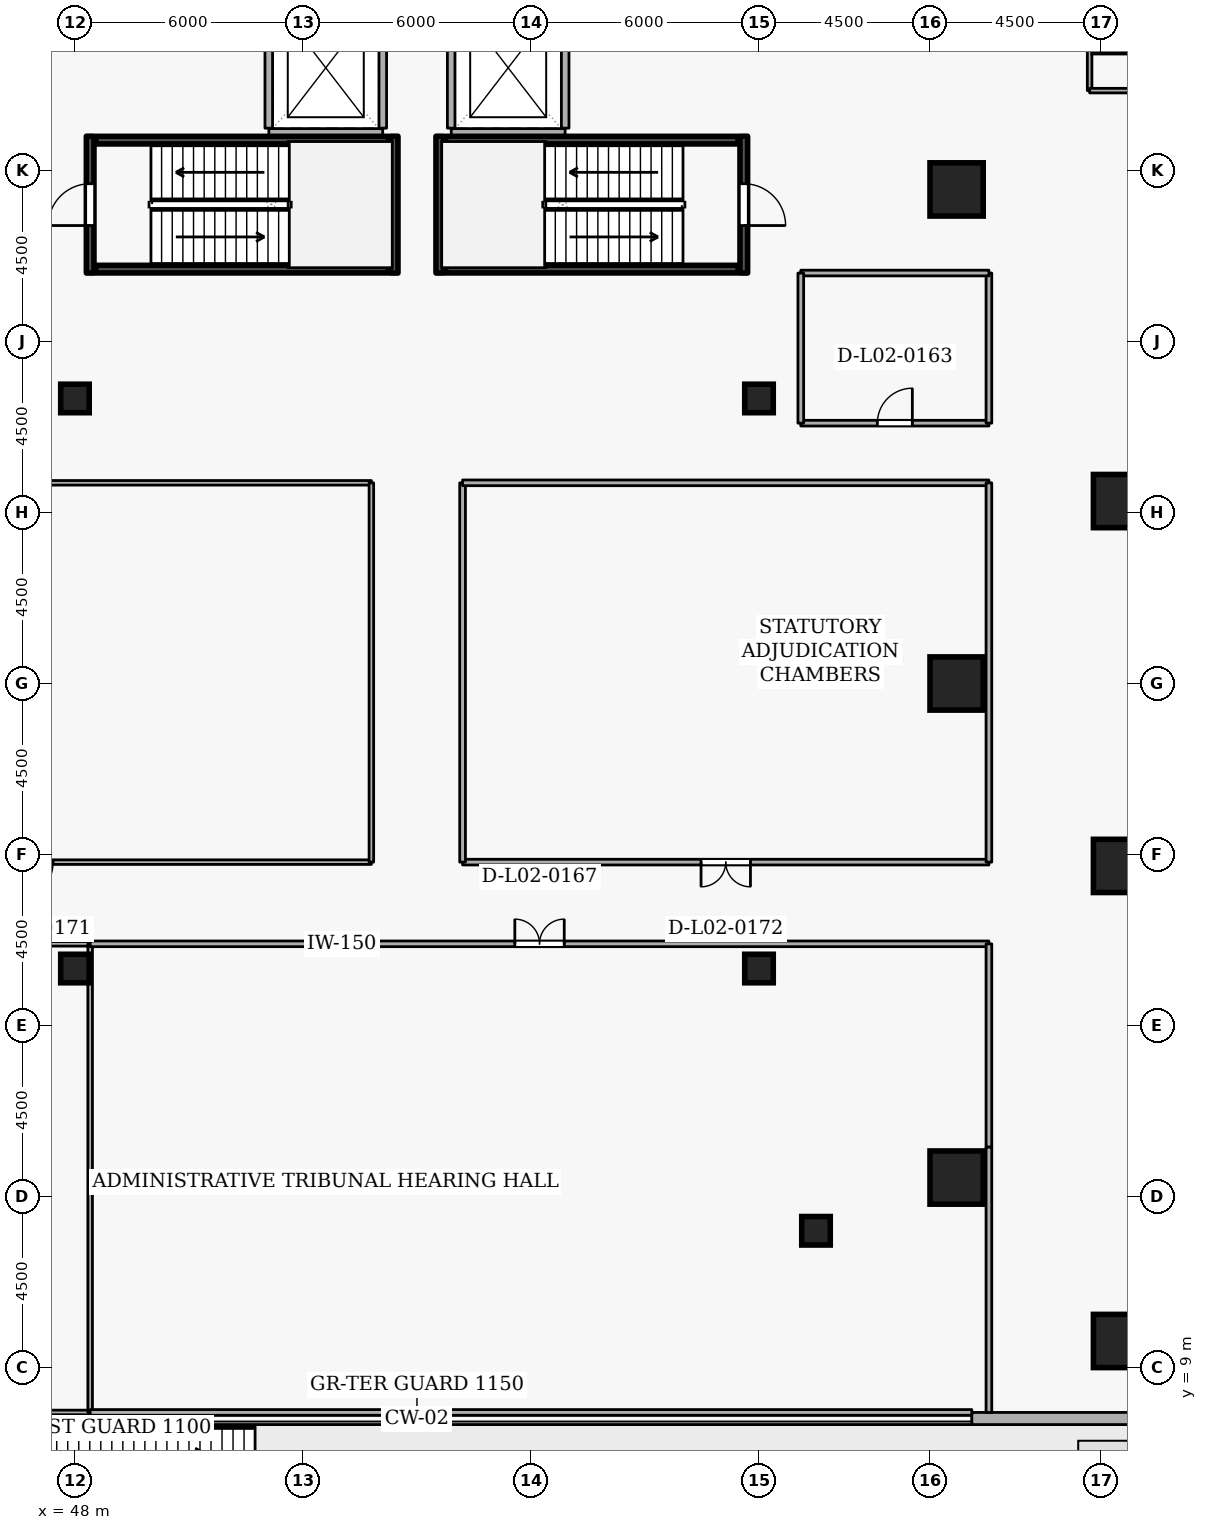
"""IFC4 building model, lengths in metres.
Left out: names, types, materials, properties, quantities, classifications, styles, units other than length and angle.
Written with IfcOpenShell. Run it as: python <this file> out.ifc"""

import sys

from ifc_helpers import new_model, si_unit, direction, frame, frame_2d, origin, origin_2d, place, context, subcontext, project, spatial, rectangle, extrude, element, fill, save


model = new_model("IFC4")
c1 = context("Model", 3, precision=1e-05, world=origin(), true_north=direction((0.0, 1.0)))
c2 = subcontext(c1, "Body", "Model", "MODEL_VIEW")
j1 = project(units=[si_unit("LENGTHUNIT", "METRE"), si_unit("PLANEANGLEUNIT", "RADIAN")], contexts=[c1])
p1 = place(None, origin())
s1 = spatial("IfcSite", under=j1, at=p1, CompositionType="ELEMENT")
p2 = place(p1, origin())
s2 = spatial("IfcBuilding", under=s1, at=p2, CompositionType="ELEMENT")
p3 = place(p2, frame((0.0, 0.0, 9.6)))
s3 = spatial("IfcBuildingStorey", under=s2, at=p3, CompositionType="ELEMENT", Elevation=9.6)
for number, where, z_axis, x_axis in (
    (1, (71.2, 14.0, 0.0), (0.0, 0.0, 1.0), (1.0, 0.0, 0.0)),
    (2, (71.2, 27.0, 0.0), (0.0, 0.0, 1.0), (1.0, 0.0, 0.0)),
    (3, (71.2, 40.0, 0.0), (0.0, 0.0, 1.0), (1.0, 0.0, 0.0)),
    (4, (75.5, 9.7, 0.0), (0.0, 0.0, 1.0), (1.0, 0.0, 0.0)),
    (5, (75.5, 22.2, 0.0), (0.0, 0.0, 1.0), (1.0, 0.0, 0.0)),
    (6, (75.5, 31.8, 0.0), (0.0, 0.0, 1.0), (1.0, 0.0, 0.0)),
):
    element("IfcColumn", number, at=place(p3, frame(where, z_axis=z_axis, x_axis=x_axis)), inside=s3, PredefinedType="COLUMN", context=c2, shape_type="SweptSolid", body=[
        extrude(rectangle(XDim=1.4, YDim=1.4, at=origin_2d()), origin(), (0.0, 0.0, 1.0), 4.5),
    ])
for number, where, z_axis, x_axis in (
    (7, (67.5, 12.6, 0.0), (0.0, 0.0, 1.0), (1.0, 0.0, 0.0)),
    (8, (48.0, 19.5, 0.0), (0.0, 0.0, 1.0), (1.0, 0.0, 0.0)),
    (9, (66.0, 19.5, 0.0), (0.0, 0.0, 1.0), (1.0, 0.0, 0.0)),
    (10, (48.0, 34.5, 0.0), (0.0, 0.0, 1.0), (1.0, 0.0, 0.0)),
    (11, (66.0, 34.5, 0.0), (0.0, 0.0, 1.0), (1.0, 0.0, 0.0)),
):
    element("IfcColumn", number, at=place(p3, frame(where, z_axis=z_axis, x_axis=x_axis)), inside=s3, PredefinedType="COLUMN", context=c2, shape_type="SweptSolid", body=[
        extrude(rectangle(XDim=0.75, YDim=0.75, at=origin_2d()), origin(), (0.0, 0.0, 1.0), 4.5),
    ])
p4 = place(p3, frame((71.6, 7.66, 0.0), z_axis=(0.0, 0.0, 1.0), x_axis=(1.0, 0.0, 0.0)))
e12 = element("IfcWall", 12, at=p4, inside=s3, PredefinedType="STANDARD", context=c2, shape_type="SweptSolid", body=[
    extrude(rectangle(XDim=39.4, YDim=0.32, at=frame_2d((19.7, 0.0))), origin(), (0.0, 0.0, 1.0), 3.56),
])
p5 = place(p4, frame((13.5, 0.0, 0.0)))
e13 = element("IfcOpeningElement", 13, at=p5, cuts=e12, PredefinedType="OPENING", context=c2, shape_type="SweptSolid", body=[
    extrude(rectangle(XDim=1.15, YDim=2.1, at=frame_2d((0.575, 1.05))), frame((0.0, 0.17, 0.0), z_axis=(0.0, -1.0, 0.0), x_axis=(1.0, 0.0, 0.0)), (0.0, 0.0, 1.0), 0.34),
])
p6 = place(p4, frame((22.8, 0.0, 0.78)))
e14 = element("IfcOpeningElement", 14, at=p6, cuts=e12, PredefinedType="OPENING", context=c2, shape_type="SweptSolid", body=[
    extrude(rectangle(XDim=1.8, YDim=2.15, at=frame_2d((0.9, 1.075))), frame((0.0, 0.17, 0.0), z_axis=(0.0, -1.0, 0.0), x_axis=(1.0, 0.0, 0.0)), (0.0, 0.0, 1.0), 0.34),
])
p7 = place(p4, frame((32.8, 0.0, 0.78)))
e15 = element("IfcOpeningElement", 15, at=p7, cuts=e12, PredefinedType="OPENING", context=c2, shape_type="SweptSolid", body=[
    extrude(rectangle(XDim=1.8, YDim=2.15, at=frame_2d((0.9, 1.075))), frame((0.0, 0.17, 0.0), z_axis=(0.0, -1.0, 0.0), x_axis=(1.0, 0.0, 0.0)), (0.0, 0.0, 1.0), 0.34),
])
p8 = place(p3, frame((53.102, 41.5, 0.0), z_axis=(0.0, 0.0, 1.0), x_axis=(1.0, 0.0, 0.0)))
e16 = element("IfcWall", 16, at=p8, inside=s3, PredefinedType="STANDARD", context=c2, shape_type="SweptSolid", body=[
    extrude(rectangle(XDim=2.996, YDim=0.2, at=frame_2d((1.498, 0.0))), origin(), (0.0, 0.0, 1.0), 4.16),
])
for number, where, z_axis, x_axis in (
    (17, (56.1, 41.612, 0.0), (0.0, 0.0, 1.0), (0.0, 1.0, 0.0)),
    (18, (53.1, 41.612, 0.0), (0.0, 0.0, 1.0), (0.0, 1.0, 0.0)),
):
    element("IfcWall", number, at=place(p3, frame(where, z_axis=z_axis, x_axis=x_axis)), inside=s3, PredefinedType="STANDARD", context=c2, shape_type="SweptSolid", body=[
        extrude(rectangle(XDim=3.286, YDim=0.2, at=frame_2d((1.643, 0.0))), origin(), (0.0, 0.0, 1.0), 4.16),
    ])
p9 = place(p3, frame((57.902, 41.5, 0.0), z_axis=(0.0, 0.0, 1.0), x_axis=(1.0, 0.0, 0.0)))
e19 = element("IfcWall", 19, at=p9, inside=s3, PredefinedType="STANDARD", context=c2, shape_type="SweptSolid", body=[
    extrude(rectangle(XDim=2.996, YDim=0.2, at=frame_2d((1.498, 0.0))), origin(), (0.0, 0.0, 1.0), 4.16),
])
for number, where, z_axis, x_axis in (
    (20, (60.9, 41.612, 0.0), (0.0, 0.0, 1.0), (0.0, 1.0, 0.0)),
    (21, (57.9, 41.612, 0.0), (0.0, 0.0, 1.0), (0.0, 1.0, 0.0)),
):
    element("IfcWall", number, at=place(p3, frame(where, z_axis=z_axis, x_axis=x_axis)), inside=s3, PredefinedType="STANDARD", context=c2, shape_type="SweptSolid", body=[
        extrude(rectangle(XDim=3.286, YDim=0.2, at=frame_2d((1.643, 0.0))), origin(), (0.0, 0.0, 1.0), 4.16),
    ])
p10 = place(p3, frame((48.4, 37.8, 0.0), z_axis=(0.0, 0.0, 1.0), x_axis=(0.0, 1.0, 0.0)))
e22 = element("IfcWall", 22, at=p10, inside=s3, PredefinedType="SHEAR", context=c2, shape_type="SweptSolid", body=[
    extrude(rectangle(XDim=3.6, YDim=0.2, at=frame_2d((1.8, 0.0))), origin(), (0.0, 0.0, 1.0), 4.5),
])
p11 = place(p10, frame((1.25, 0.0, 0.0)))
e23 = element("IfcOpeningElement", 23, at=p11, cuts=e22, PredefinedType="OPENING", context=c2, shape_type="SweptSolid", body=[
    extrude(rectangle(XDim=1.1, YDim=2.1, at=frame_2d((0.55, 1.05))), frame((0.0, 0.11, 0.0), z_axis=(0.0, -1.0, 0.0), x_axis=(1.0, 0.0, 0.0)), (0.0, 0.0, 1.0), 0.22),
])
p12 = place(p3, frame((56.4, 41.4, 0.0), z_axis=(0.0, 0.0, 1.0), x_axis=(0.0, -1.0, 0.0)))
e24 = element("IfcWall", 24, at=p12, inside=s3, PredefinedType="SHEAR", context=c2, shape_type="SweptSolid", body=[
    extrude(rectangle(XDim=3.6, YDim=0.2, at=frame_2d((1.8, 0.0))), origin(), (0.0, 0.0, 1.0), 4.5),
])
for number, where, z_axis, x_axis in (
    (25, (56.25, 41.297, 0.0), (0.0, 0.0, 1.0), (-1.0, 0.0, 0.0)),
    (26, (48.55, 37.903, 0.0), (0.0, 0.0, 1.0), (1.0, 0.0, 0.0)),
):
    element("IfcWall", number, at=place(p3, frame(where, z_axis=z_axis, x_axis=x_axis)), inside=s3, PredefinedType="SHEAR", context=c2, shape_type="SweptSolid", body=[
        extrude(rectangle(XDim=7.7, YDim=0.2, at=frame_2d((3.85, 0.0))), origin(), (0.0, 0.0, 1.0), 4.5),
    ])
p13 = place(p3, frame((65.6, 41.4, 0.0), z_axis=(0.0, 0.0, 1.0), x_axis=(0.0, -1.0, 0.0)))
e27 = element("IfcWall", 27, at=p13, inside=s3, PredefinedType="SHEAR", context=c2, shape_type="SweptSolid", body=[
    extrude(rectangle(XDim=3.6, YDim=0.2, at=frame_2d((1.8, 0.0))), origin(), (0.0, 0.0, 1.0), 4.5),
])
p14 = place(p13, frame((1.25, 0.0, 0.0)))
e28 = element("IfcOpeningElement", 28, at=p14, cuts=e27, PredefinedType="OPENING", context=c2, shape_type="SweptSolid", body=[
    extrude(rectangle(XDim=1.1, YDim=2.1, at=frame_2d((0.55, 1.05))), frame((0.0, 0.11, 0.0), z_axis=(0.0, -1.0, 0.0), x_axis=(1.0, 0.0, 0.0)), (0.0, 0.0, 1.0), 0.22),
])
p15 = place(p3, frame((57.6, 37.8, 0.0), z_axis=(0.0, 0.0, 1.0), x_axis=(0.0, 1.0, 0.0)))
e29 = element("IfcWall", 29, at=p15, inside=s3, PredefinedType="SHEAR", context=c2, shape_type="SweptSolid", body=[
    extrude(rectangle(XDim=3.6, YDim=0.2, at=frame_2d((1.8, 0.0))), origin(), (0.0, 0.0, 1.0), 4.5),
])
for number, where, z_axis, x_axis in (
    (30, (57.75, 37.903, 0.0), (0.0, 0.0, 1.0), (1.0, 0.0, 0.0)),
    (31, (65.45, 41.297, 0.0), (0.0, 0.0, 1.0), (-1.0, 0.0, 0.0)),
):
    element("IfcWall", number, at=place(p3, frame(where, z_axis=z_axis, x_axis=x_axis)), inside=s3, PredefinedType="SHEAR", context=c2, shape_type="SweptSolid", body=[
        extrude(rectangle(XDim=7.7, YDim=0.2, at=frame_2d((3.85, 0.0))), origin(), (0.0, 0.0, 1.0), 4.5),
    ])
p16 = place(p3, frame((67.1, 33.85, 0.0), z_axis=(0.0, 0.0, 1.0), x_axis=(1.0, 0.0, 0.0)))
e32 = element("IfcWall", 32, at=p16, inside=s3, PredefinedType="PARTITIONING", context=c2, shape_type="SweptSolid", body=[
    extrude(rectangle(XDim=4.95, YDim=0.15, at=frame_2d((2.475, 0.0))), origin(), (0.0, 0.0, 1.0), 4.16),
])
p17 = place(p16, frame((2.015, 0.0, 0.0)))
e33 = element("IfcOpeningElement", 33, at=p17, cuts=e32, PredefinedType="OPENING", context=c2, shape_type="SweptSolid", body=[
    extrude(rectangle(XDim=0.92, YDim=2.08, at=frame_2d((0.46, 1.04))), frame((0.0, 0.085, 0.0), z_axis=(0.0, -1.0, 0.0), x_axis=(1.0, 0.0, 0.0)), (0.0, 0.0, 1.0), 0.17),
])
p18 = place(p3, frame((72.05, 33.85, 0.0), z_axis=(0.0, 0.0, 1.0), x_axis=(0.0, 1.0, 0.0)))
e34 = element("IfcWall", 34, at=p18, inside=s3, PredefinedType="PARTITIONING", context=c2, shape_type="SweptSolid", body=[
    extrude(rectangle(XDim=3.95, YDim=0.15, at=frame_2d((1.975, 0.0))), origin(), (0.0, 0.0, 1.0), 4.16),
])
p19 = place(p3, frame((72.05, 37.8, 0.0), z_axis=(0.0, 0.0, 1.0), x_axis=(-1.0, 0.0, 0.0)))
e35 = element("IfcWall", 35, at=p19, inside=s3, PredefinedType="PARTITIONING", context=c2, shape_type="SweptSolid", body=[
    extrude(rectangle(XDim=4.95, YDim=0.15, at=frame_2d((2.475, 0.0))), origin(), (0.0, 0.0, 1.0), 4.16),
])
p20 = place(p3, frame((67.1, 37.8, 0.0), z_axis=(0.0, 0.0, 1.0), x_axis=(0.0, -1.0, 0.0)))
e36 = element("IfcWall", 36, at=p20, inside=s3, PredefinedType="PARTITIONING", context=c2, shape_type="SweptSolid", body=[
    extrude(rectangle(XDim=3.95, YDim=0.15, at=frame_2d((1.975, 0.0))), origin(), (0.0, 0.0, 1.0), 4.16),
])
p21 = place(p3, frame((48.4, 7.82, 0.0), z_axis=(0.0, 0.0, 1.0), x_axis=(-1.0, 0.0, 0.0)))
e37 = element("IfcWall", 37, at=p21, inside=s3, PredefinedType="PARTITIONING", context=c2, shape_type="SweptSolid", body=[
    extrude(rectangle(XDim=6.0, YDim=0.12, at=frame_2d((3.0, 0.0))), origin(), (0.0, 0.0, 1.0), 4.16),
])
p22 = place(p3, frame((33.5, 20.15, 0.0), z_axis=(0.0, 0.0, 1.0), x_axis=(1.0, 0.0, 0.0)))
e38 = element("IfcWall", 38, at=p22, inside=s3, PredefinedType="PARTITIONING", context=c2, shape_type="SweptSolid", body=[
    extrude(rectangle(XDim=14.9, YDim=0.12, at=frame_2d((7.45, 0.0))), origin(), (0.0, 0.0, 1.0), 4.16),
])
p23 = place(p22, frame((6.925, 0.0, 0.0)))
e39 = element("IfcOpeningElement", 39, at=p23, cuts=e38, PredefinedType="OPENING", context=c2, shape_type="SweptSolid", body=[
    extrude(rectangle(XDim=1.05, YDim=2.1, at=frame_2d((0.525, 1.05))), frame((0.0, 0.07, 0.0), z_axis=(0.0, -1.0, 0.0), x_axis=(1.0, 0.0, 0.0)), (0.0, 0.0, 1.0), 0.14),
])
p24 = place(p3, frame((48.4, 20.15, 0.0), z_axis=(0.0, 0.0, 1.0), x_axis=(0.0, -1.0, 0.0)))
e40 = element("IfcWall", 40, at=p24, inside=s3, PredefinedType="PARTITIONING", context=c2, shape_type="SweptSolid", body=[
    extrude(rectangle(XDim=12.33, YDim=0.12, at=frame_2d((6.165, 0.0))), origin(), (0.0, 0.0, 1.0), 4.16),
])
p25 = place(p3, frame((71.6, 7.82, 0.0), z_axis=(0.0, 0.0, 1.0), x_axis=(-1.0, 0.0, 0.0)))
e41 = element("IfcWall", 41, at=p25, inside=s3, PredefinedType="PARTITIONING", context=c2, shape_type="SweptSolid", body=[
    extrude(rectangle(XDim=23.2, YDim=0.15, at=frame_2d((11.6, 0.0))), origin(), (0.0, 0.0, 1.0), 4.16),
])
p26 = place(p3, frame((48.4, 20.15, 0.0), z_axis=(0.0, 0.0, 1.0), x_axis=(1.0, 0.0, 0.0)))
e42 = element("IfcWall", 42, at=p26, inside=s3, PredefinedType="PARTITIONING", context=c2, shape_type="SweptSolid", body=[
    extrude(rectangle(XDim=23.65, YDim=0.15, at=frame_2d((11.825, 0.0))), origin(), (0.0, 0.0, 1.0), 4.16),
])
p27 = place(p26, frame((11.175, 0.0, 0.0)))
e43 = element("IfcOpeningElement", 43, at=p27, cuts=e42, PredefinedType="OPENING", context=c2, shape_type="SweptSolid", body=[
    extrude(rectangle(XDim=1.3, YDim=2.12, at=frame_2d((0.65, 1.06))), frame((0.0, 0.085, 0.0), z_axis=(0.0, -1.0, 0.0), x_axis=(1.0, 0.0, 0.0)), (0.0, 0.0, 1.0), 0.17),
])
p28 = place(p3, frame((72.05, 20.15, 0.0), z_axis=(0.0, 0.0, 1.0), x_axis=(0.0, -1.0, 0.0)))
e44 = element("IfcWall", 44, at=p28, inside=s3, PredefinedType="PARTITIONING", context=c2, shape_type="SweptSolid", body=[
    extrude(rectangle(XDim=5.35, YDim=0.15, at=frame_2d((2.675, 0.0))), origin(), (0.0, 0.0, 1.0), 4.16),
])
p29 = place(p3, frame((72.05, 14.8, 0.0), z_axis=(0.0, 0.0, 1.0), x_axis=(0.0, -1.0, 0.0)))
e45 = element("IfcWall", 45, at=p29, inside=s3, PredefinedType="PARTITIONING", context=c2, shape_type="SweptSolid", body=[
    extrude(rectangle(XDim=6.98, YDim=0.15, at=frame_2d((3.49, 0.0))), origin(), (0.0, 0.0, 1.0), 4.16),
])
p30 = place(p3, frame((55.8, 22.3, 0.0), z_axis=(0.0, 0.0, 1.0), x_axis=(-1.0, 0.0, 0.0)))
e46 = element("IfcWall", 46, at=p30, inside=s3, PredefinedType="PARTITIONING", context=c2, shape_type="SweptSolid", body=[
    extrude(rectangle(XDim=17.8, YDim=0.12, at=frame_2d((8.9, 0.0))), origin(), (0.0, 0.0, 1.0), 4.16),
])
p31 = place(p30, frame((8.375, 0.0, 0.0)))
e47 = element("IfcOpeningElement", 47, at=p31, cuts=e46, PredefinedType="OPENING", context=c2, shape_type="SweptSolid", body=[
    extrude(rectangle(XDim=1.05, YDim=2.1, at=frame_2d((0.525, 1.05))), frame((0.0, 0.07, 0.0), z_axis=(0.0, -1.0, 0.0), x_axis=(1.0, 0.0, 0.0)), (0.0, 0.0, 1.0), 0.14),
])
p32 = place(p3, frame((38.0, 32.28, 0.0), z_axis=(0.0, 0.0, 1.0), x_axis=(1.0, 0.0, 0.0)))
e48 = element("IfcWall", 48, at=p32, inside=s3, PredefinedType="PARTITIONING", context=c2, shape_type="SweptSolid", body=[
    extrude(rectangle(XDim=17.8, YDim=0.12, at=frame_2d((8.9, 0.0))), origin(), (0.0, 0.0, 1.0), 4.16),
])
p33 = place(p3, frame((55.8, 32.28, 0.0), z_axis=(0.0, 0.0, 1.0), x_axis=(0.0, -1.0, 0.0)))
e49 = element("IfcWall", 49, at=p33, inside=s3, PredefinedType="PARTITIONING", context=c2, shape_type="SweptSolid", body=[
    extrude(rectangle(XDim=9.98, YDim=0.12, at=frame_2d((4.99, 0.0))), origin(), (0.0, 0.0, 1.0), 4.16),
])
p34 = place(p3, frame((72.05, 22.3, 0.0), z_axis=(0.0, 0.0, 1.0), x_axis=(-1.0, 0.0, 0.0)))
e50 = element("IfcWall", 50, at=p34, inside=s3, PredefinedType="PARTITIONING", context=c2, shape_type="SweptSolid", body=[
    extrude(rectangle(XDim=13.85, YDim=0.15, at=frame_2d((6.925, 0.0))), origin(), (0.0, 0.0, 1.0), 4.16),
])
p35 = place(p34, frame((6.275, 0.0, 0.0)))
e51 = element("IfcOpeningElement", 51, at=p35, cuts=e50, PredefinedType="OPENING", context=c2, shape_type="SweptSolid", body=[
    extrude(rectangle(XDim=1.3, YDim=2.12, at=frame_2d((0.65, 1.06))), frame((0.0, 0.085, 0.0), z_axis=(0.0, -1.0, 0.0), x_axis=(1.0, 0.0, 0.0)), (0.0, 0.0, 1.0), 0.17),
])
p36 = place(p3, frame((58.2, 22.3, 0.0), z_axis=(0.0, 0.0, 1.0), x_axis=(0.0, 1.0, 0.0)))
e52 = element("IfcWall", 52, at=p36, inside=s3, PredefinedType="PARTITIONING", context=c2, shape_type="SweptSolid", body=[
    extrude(rectangle(XDim=9.98, YDim=0.15, at=frame_2d((4.99, 0.0))), origin(), (0.0, 0.0, 1.0), 4.16),
])
p37 = place(p3, frame((58.2, 32.28, 0.0), z_axis=(0.0, 0.0, 1.0), x_axis=(1.0, 0.0, 0.0)))
e53 = element("IfcWall", 53, at=p37, inside=s3, PredefinedType="PARTITIONING", context=c2, shape_type="SweptSolid", body=[
    extrude(rectangle(XDim=13.85, YDim=0.15, at=frame_2d((6.925, 0.0))), origin(), (0.0, 0.0, 1.0), 4.16),
])
p38 = place(p3, frame((72.05, 32.28, 0.0), z_axis=(0.0, 0.0, 1.0), x_axis=(0.0, -1.0, 0.0)))
e54 = element("IfcWall", 54, at=p38, inside=s3, PredefinedType="PARTITIONING", context=c2, shape_type="SweptSolid", body=[
    extrude(rectangle(XDim=9.98, YDim=0.15, at=frame_2d((4.99, 0.0))), origin(), (0.0, 0.0, 1.0), 4.16),
])
p39 = place(p3, frame((74.7, 42.6, 0.0), z_axis=(0.0, 0.0, 1.0), x_axis=(0.0, 1.0, 0.0)))
e55 = element("IfcWall", 55, at=p39, inside=s3, PredefinedType="PARTITIONING", context=c2, shape_type="SweptSolid", body=[
    extrude(rectangle(XDim=6.58, YDim=0.12, at=frame_2d((3.29, 0.0))), origin(), (0.0, 0.0, 1.0), 4.16),
])
p40 = place(p3, frame((88.5, 42.6, 0.0), z_axis=(0.0, 0.0, 1.0), x_axis=(-1.0, 0.0, 0.0)))
e56 = element("IfcWall", 56, at=p40, inside=s3, PredefinedType="PARTITIONING", context=c2, shape_type="SweptSolid", body=[
    extrude(rectangle(XDim=13.8, YDim=0.12, at=frame_2d((6.9, 0.0))), origin(), (0.0, 0.0, 1.0), 4.16),
])
p41 = place(p40, frame((6.375, 0.0, 0.0)))
e57 = element("IfcOpeningElement", 57, at=p41, cuts=e56, PredefinedType="OPENING", context=c2, shape_type="SweptSolid", body=[
    extrude(rectangle(XDim=1.05, YDim=2.1, at=frame_2d((0.525, 1.05))), frame((0.0, 0.07, 0.0), z_axis=(0.0, -1.0, 0.0), x_axis=(1.0, 0.0, 0.0)), (0.0, 0.0, 1.0), 0.14),
])
p42 = place(p11, origin())
e58 = element("IfcDoor", 58, at=p42, inside=s3, OperationType="SINGLE_SWING_LEFT", PredefinedType="DOOR", context=c2, shape_type="SweptSolid", body=[
    extrude(rectangle(XDim=1.1, YDim=2.1, at=frame_2d((0.55, 1.05))), frame((0.0, 0.025, 0.0), z_axis=(0.0, -1.0, 0.0), x_axis=(1.0, 0.0, 0.0)), (0.0, 0.0, 1.0), 0.05),
])
fill(e23, e58)
p43 = place(p14, origin())
e59 = element("IfcDoor", 59, at=p43, inside=s3, OperationType="SINGLE_SWING_RIGHT", PredefinedType="DOOR", context=c2, shape_type="SweptSolid", body=[
    extrude(rectangle(XDim=1.1, YDim=2.1, at=frame_2d((0.55, 1.05))), frame((0.0, 0.025, 0.0), z_axis=(0.0, -1.0, 0.0), x_axis=(1.0, 0.0, 0.0)), (0.0, 0.0, 1.0), 0.05),
])
fill(e28, e59)
p44 = place(p17, origin())
e60 = element("IfcDoor", 60, at=p44, inside=s3, OperationType="SINGLE_SWING_RIGHT", PredefinedType="DOOR", context=c2, shape_type="SweptSolid", body=[
    extrude(rectangle(XDim=0.92, YDim=2.08, at=frame_2d((0.46, 1.04))), frame((0.0, 0.025, 0.0), z_axis=(0.0, -1.0, 0.0), x_axis=(1.0, 0.0, 0.0)), (0.0, 0.0, 1.0), 0.05),
])
fill(e33, e60)
p45 = place(p27, origin())
e61 = element("IfcDoor", 61, at=p45, inside=s3, OperationType="DOUBLE_DOOR_SINGLE_SWING", PredefinedType="DOOR", context=c2, shape_type="SweptSolid", body=[
    extrude(rectangle(XDim=1.3, YDim=2.12, at=frame_2d((0.65, 1.06))), frame((0.0, 0.025, 0.0), z_axis=(0.0, -1.0, 0.0), x_axis=(1.0, 0.0, 0.0)), (0.0, 0.0, 1.0), 0.05),
])
fill(e43, e61)
p46 = place(p31, origin())
e62 = element("IfcDoor", 62, at=p46, inside=s3, OperationType="SINGLE_SWING_RIGHT", PredefinedType="DOOR", context=c2, shape_type="SweptSolid", body=[
    extrude(rectangle(XDim=1.05, YDim=2.1, at=frame_2d((0.525, 1.05))), frame((0.0, 0.025, 0.0), z_axis=(0.0, -1.0, 0.0), x_axis=(1.0, 0.0, 0.0)), (0.0, 0.0, 1.0), 0.05),
])
fill(e47, e62)
p47 = place(p35, origin())
e63 = element("IfcDoor", 63, at=p47, inside=s3, OperationType="DOUBLE_DOOR_SINGLE_SWING", PredefinedType="DOOR", context=c2, shape_type="SweptSolid", body=[
    extrude(rectangle(XDim=1.3, YDim=2.12, at=frame_2d((0.65, 1.06))), frame((0.0, 0.025, 0.0), z_axis=(0.0, -1.0, 0.0), x_axis=(1.0, 0.0, 0.0)), (0.0, 0.0, 1.0), 0.05),
])
fill(e51, e63)
save(model, sys.argv[1])
